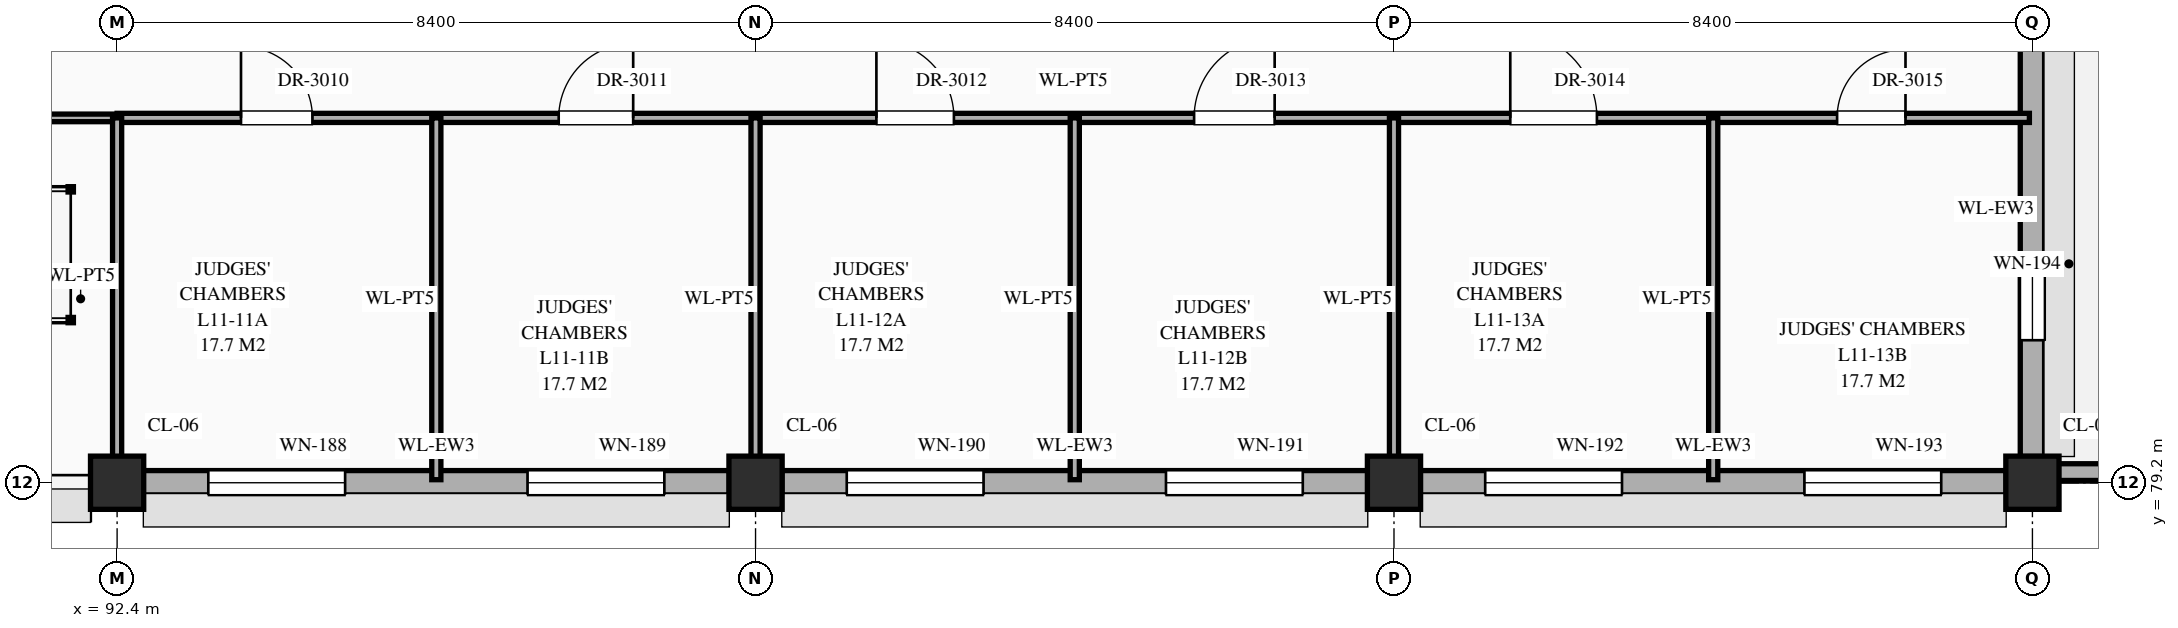
"""IFC4 building model, lengths in metres.
Left out: names, types, materials, properties, quantities, classifications, styles, units other than length and angle.
Written with IfcOpenShell. Run it as: python <this file> out.ifc"""

import sys

from ifc_helpers import new_model, si_unit, direction, frame, frame_2d, origin, origin_2d, place, context, subcontext, project, spatial, rectangle, extrude, element, fill, save


model = new_model("IFC4")
c1 = context("Model", 3, precision=1e-05, world=origin(), true_north=direction((0.0, 1.0)))
c2 = subcontext(c1, "Body", "Model", "MODEL_VIEW")
j1 = project(units=[si_unit("LENGTHUNIT", "METRE"), si_unit("PLANEANGLEUNIT", "RADIAN")], contexts=[c1])
p1 = place(None, origin())
s1 = spatial("IfcSite", under=j1, at=p1, CompositionType="ELEMENT")
p2 = place(p1, origin())
s2 = spatial("IfcBuilding", under=s1, at=p2, CompositionType="ELEMENT")
p3 = place(p2, frame((0.0, 0.0, 47.7)))
s3 = spatial("IfcBuildingStorey", under=s2, at=p3, CompositionType="ELEMENT", Elevation=47.7)
for number, where, z_axis, x_axis in (
    (1, (92.4, 79.2, 0.0), (0.0, 0.0, 1.0), (1.0, 0.0, 0.0)),
    (2, (100.8, 79.2, 0.0), (0.0, 0.0, 1.0), (1.0, 0.0, 0.0)),
    (3, (109.2, 79.2, 0.0), (0.0, 0.0, 1.0), (1.0, 0.0, 0.0)),
    (4, (117.6, 79.2, 0.0), (0.0, 0.0, 1.0), (1.0, 0.0, 0.0)),
):
    element("IfcColumn", number, at=place(p3, frame(where, z_axis=z_axis, x_axis=x_axis)), inside=s3, PredefinedType="COLUMN", context=c2, shape_type="SweptSolid", body=[
        extrude(rectangle(XDim=0.7, YDim=0.7, at=origin_2d()), origin(), (0.0, 0.0, 1.0), 4.2),
    ])
p4 = place(p3, frame((92.745, 79.2, 0.0), z_axis=(0.0, 0.0, 1.0), x_axis=(1.0, 0.0, 0.0)))
e5 = element("IfcWall", 5, at=p4, inside=s3, PredefinedType="STANDARD", context=c2, shape_type="SweptSolid", body=[
    extrude(rectangle(XDim=7.71, YDim=0.32, at=frame_2d((3.855, 0.0))), origin(), (0.0, 0.0, 1.0), 3.31),
])
p5 = place(p4, frame((0.855, 0.0, 0.55)))
e6 = element("IfcOpeningElement", 6, at=p5, cuts=e5, PredefinedType="OPENING", context=c2, shape_type="SweptSolid", body=[
    extrude(rectangle(XDim=1.8, YDim=2.12, at=frame_2d((0.9, 1.06))), frame((0.0, 0.172, 0.0), z_axis=(0.0, -1.0, 0.0), x_axis=(1.0, 0.0, 0.0)), (0.0, 0.0, 1.0), 0.344),
])
p6 = place(p4, frame((5.055, 0.0, 0.55)))
e7 = element("IfcOpeningElement", 7, at=p6, cuts=e5, PredefinedType="OPENING", context=c2, shape_type="SweptSolid", body=[
    extrude(rectangle(XDim=1.8, YDim=2.12, at=frame_2d((0.9, 1.06))), frame((0.0, 0.172, 0.0), z_axis=(0.0, -1.0, 0.0), x_axis=(1.0, 0.0, 0.0)), (0.0, 0.0, 1.0), 0.344),
])
p7 = place(p3, frame((101.145, 79.2, 0.0), z_axis=(0.0, 0.0, 1.0), x_axis=(1.0, 0.0, 0.0)))
e8 = element("IfcWall", 8, at=p7, inside=s3, PredefinedType="STANDARD", context=c2, shape_type="SweptSolid", body=[
    extrude(rectangle(XDim=7.71, YDim=0.32, at=frame_2d((3.855, 0.0))), origin(), (0.0, 0.0, 1.0), 3.31),
])
p8 = place(p7, frame((0.855, 0.0, 0.55)))
e9 = element("IfcOpeningElement", 9, at=p8, cuts=e8, PredefinedType="OPENING", context=c2, shape_type="SweptSolid", body=[
    extrude(rectangle(XDim=1.8, YDim=2.12, at=frame_2d((0.9, 1.06))), frame((0.0, 0.172, 0.0), z_axis=(0.0, -1.0, 0.0), x_axis=(1.0, 0.0, 0.0)), (0.0, 0.0, 1.0), 0.344),
])
p9 = place(p7, frame((5.055, 0.0, 0.55)))
e10 = element("IfcOpeningElement", 10, at=p9, cuts=e8, PredefinedType="OPENING", context=c2, shape_type="SweptSolid", body=[
    extrude(rectangle(XDim=1.8, YDim=2.12, at=frame_2d((0.9, 1.06))), frame((0.0, 0.172, 0.0), z_axis=(0.0, -1.0, 0.0), x_axis=(1.0, 0.0, 0.0)), (0.0, 0.0, 1.0), 0.344),
])
p10 = place(p3, frame((109.545, 79.2, 0.0), z_axis=(0.0, 0.0, 1.0), x_axis=(1.0, 0.0, 0.0)))
e11 = element("IfcWall", 11, at=p10, inside=s3, PredefinedType="STANDARD", context=c2, shape_type="SweptSolid", body=[
    extrude(rectangle(XDim=7.71, YDim=0.32, at=frame_2d((3.855, 0.0))), origin(), (0.0, 0.0, 1.0), 3.31),
])
p11 = place(p10, frame((0.855, 0.0, 0.55)))
e12 = element("IfcOpeningElement", 12, at=p11, cuts=e11, PredefinedType="OPENING", context=c2, shape_type="SweptSolid", body=[
    extrude(rectangle(XDim=1.8, YDim=2.12, at=frame_2d((0.9, 1.06))), frame((0.0, 0.172, 0.0), z_axis=(0.0, -1.0, 0.0), x_axis=(1.0, 0.0, 0.0)), (0.0, 0.0, 1.0), 0.344),
])
p12 = place(p10, frame((5.055, 0.0, 0.55)))
e13 = element("IfcOpeningElement", 13, at=p12, cuts=e11, PredefinedType="OPENING", context=c2, shape_type="SweptSolid", body=[
    extrude(rectangle(XDim=1.8, YDim=2.12, at=frame_2d((0.9, 1.06))), frame((0.0, 0.172, 0.0), z_axis=(0.0, -1.0, 0.0), x_axis=(1.0, 0.0, 0.0)), (0.0, 0.0, 1.0), 0.344),
])
p13 = place(p3, frame((117.6, 79.545, 0.0), z_axis=(0.0, 0.0, 1.0), x_axis=(0.0, 1.0, 0.0)))
e14 = element("IfcWall", 14, at=p13, inside=s3, PredefinedType="STANDARD", context=c2, shape_type="SweptSolid", body=[
    extrude(rectangle(XDim=6.51, YDim=0.32, at=frame_2d((3.255, 0.0))), origin(), (0.0, 0.0, 1.0), 3.31),
])
p14 = place(p13, frame((1.53, 0.0, 0.55)))
e15 = element("IfcOpeningElement", 15, at=p14, cuts=e14, PredefinedType="OPENING", context=c2, shape_type="SweptSolid", body=[
    extrude(rectangle(XDim=1.05, YDim=1.56, at=frame_2d((0.525, 0.78))), frame((0.0, 0.172, 0.0), z_axis=(0.0, -1.0, 0.0), x_axis=(1.0, 0.0, 0.0)), (0.0, 0.0, 1.0), 0.344),
])
p15 = place(p3, frame((117.9, 79.34, 0.0), z_axis=(0.0, 0.0, 1.0), x_axis=(1.0, 0.0, 0.0)))
e16 = element("IfcWall", 16, at=p15, inside=s3, PredefinedType="PARAPET", context=c2, shape_type="SweptSolid", body=[
    extrude(rectangle(XDim=7.96, YDim=0.22, at=frame_2d((3.98, 0.0))), origin(), (0.0, 0.0, 1.0), 1.2),
])
p16 = place(p3, frame((75.6, 84.0, 0.0), z_axis=(0.0, 0.0, 1.0), x_axis=(1.0, 0.0, 0.0)))
e17 = element("IfcWall", 17, at=p16, inside=s3, PredefinedType="STANDARD", context=c2, shape_type="SweptSolid", body=[
    extrude(rectangle(XDim=16.8, YDim=0.1, at=frame_2d((8.4, 0.0))), origin(), (0.0, 0.0, 1.0), 3.96),
])
p17 = place(p16, frame((3.58, 0.0, 0.0)))
e18 = element("IfcOpeningElement", 18, at=p17, cuts=e17, PredefinedType="OPENING", context=c2, shape_type="SweptSolid", body=[
    extrude(rectangle(XDim=1.24, YDim=2.3, at=frame_2d((0.62, 1.15))), frame((0.0, 0.062, 0.0), z_axis=(0.0, -1.0, 0.0), x_axis=(1.0, 0.0, 0.0)), (0.0, 0.0, 1.0), 0.124),
])
p18 = place(p16, frame((11.96, 0.0, 0.0)))
e19 = element("IfcOpeningElement", 19, at=p18, cuts=e17, PredefinedType="OPENING", context=c2, shape_type="SweptSolid", body=[
    extrude(rectangle(XDim=1.28, YDim=2.35, at=frame_2d((0.64, 1.175))), frame((0.0, 0.062, 0.0), z_axis=(0.0, -1.0, 0.0), x_axis=(1.0, 0.0, 0.0)), (0.0, 0.0, 1.0), 0.124),
])
p19 = place(p3, frame((92.4, 84.0, 0.0), z_axis=(0.0, 0.0, 1.0), x_axis=(1.0, 0.0, 0.0)))
e20 = element("IfcWall", 20, at=p19, inside=s3, PredefinedType="STANDARD", context=c2, shape_type="SweptSolid", body=[
    extrude(rectangle(XDim=25.16, YDim=0.12, at=frame_2d((12.58, 0.0))), origin(), (0.0, 0.0, 1.0), 3.96),
])
p20 = place(p19, frame((1.63, 0.0, 0.0)))
e21 = element("IfcOpeningElement", 21, at=p20, cuts=e20, PredefinedType="OPENING", context=c2, shape_type="SweptSolid", body=[
    extrude(rectangle(XDim=0.94, YDim=2.3, at=frame_2d((0.47, 1.15))), frame((0.0, 0.072, 0.0), z_axis=(0.0, -1.0, 0.0), x_axis=(1.0, 0.0, 0.0)), (0.0, 0.0, 1.0), 0.144),
])
p21 = place(p19, frame((5.81, 0.0, 0.0)))
e22 = element("IfcOpeningElement", 22, at=p21, cuts=e20, PredefinedType="OPENING", context=c2, shape_type="SweptSolid", body=[
    extrude(rectangle(XDim=0.98, YDim=2.35, at=frame_2d((0.49, 1.175))), frame((0.0, 0.072, 0.0), z_axis=(0.0, -1.0, 0.0), x_axis=(1.0, 0.0, 0.0)), (0.0, 0.0, 1.0), 0.144),
])
p22 = place(p19, frame((9.99, 0.0, 0.0)))
e23 = element("IfcOpeningElement", 23, at=p22, cuts=e20, PredefinedType="OPENING", context=c2, shape_type="SweptSolid", body=[
    extrude(rectangle(XDim=1.02, YDim=2.4, at=frame_2d((0.51, 1.2))), frame((0.0, 0.072, 0.0), z_axis=(0.0, -1.0, 0.0), x_axis=(1.0, 0.0, 0.0)), (0.0, 0.0, 1.0), 0.144),
])
p23 = place(p19, frame((14.17, 0.0, 0.0)))
e24 = element("IfcOpeningElement", 24, at=p23, cuts=e20, PredefinedType="OPENING", context=c2, shape_type="SweptSolid", body=[
    extrude(rectangle(XDim=1.06, YDim=2.4, at=frame_2d((0.53, 1.2))), frame((0.0, 0.072, 0.0), z_axis=(0.0, -1.0, 0.0), x_axis=(1.0, 0.0, 0.0)), (0.0, 0.0, 1.0), 0.144),
])
p24 = place(p19, frame((18.33, 0.0, 0.0)))
e25 = element("IfcOpeningElement", 25, at=p24, cuts=e20, PredefinedType="OPENING", context=c2, shape_type="SweptSolid", body=[
    extrude(rectangle(XDim=1.14, YDim=2.4, at=frame_2d((0.57, 1.2))), frame((0.0, 0.072, 0.0), z_axis=(0.0, -1.0, 0.0), x_axis=(1.0, 0.0, 0.0)), (0.0, 0.0, 1.0), 0.144),
])
p25 = place(p19, frame((22.63, 0.0, 0.0)))
e26 = element("IfcOpeningElement", 26, at=p25, cuts=e20, PredefinedType="OPENING", context=c2, shape_type="SweptSolid", body=[
    extrude(rectangle(XDim=0.9, YDim=2.15, at=frame_2d((0.45, 1.075))), frame((0.0, 0.072, 0.0), z_axis=(0.0, -1.0, 0.0), x_axis=(1.0, 0.0, 0.0)), (0.0, 0.0, 1.0), 0.144),
])
p26 = place(p3, frame((92.4, 79.24, 0.0), z_axis=(0.0, 0.0, 1.0), x_axis=(0.0, 1.0, 0.0)))
e27 = element("IfcWall", 27, at=p26, inside=s3, PredefinedType="STANDARD", context=c2, shape_type="SweptSolid", body=[
    extrude(rectangle(XDim=4.76, YDim=0.12, at=frame_2d((2.38, 0.0))), origin(), (0.0, 0.0, 1.0), 3.21),
])
p27 = place(p3, frame((96.6, 79.24, 0.0), z_axis=(0.0, 0.0, 1.0), x_axis=(0.0, 1.0, 0.0)))
e28 = element("IfcWall", 28, at=p27, inside=s3, PredefinedType="STANDARD", context=c2, shape_type="SweptSolid", body=[
    extrude(rectangle(XDim=4.76, YDim=0.12, at=frame_2d((2.38, 0.0))), origin(), (0.0, 0.0, 1.0), 3.61),
])
p28 = place(p3, frame((100.8, 79.24, 0.0), z_axis=(0.0, 0.0, 1.0), x_axis=(0.0, 1.0, 0.0)))
e29 = element("IfcWall", 29, at=p28, inside=s3, PredefinedType="STANDARD", context=c2, shape_type="SweptSolid", body=[
    extrude(rectangle(XDim=4.76, YDim=0.12, at=frame_2d((2.38, 0.0))), origin(), (0.0, 0.0, 1.0), 3.21),
])
p29 = place(p3, frame((105.0, 79.24, 0.0), z_axis=(0.0, 0.0, 1.0), x_axis=(0.0, 1.0, 0.0)))
e30 = element("IfcWall", 30, at=p29, inside=s3, PredefinedType="STANDARD", context=c2, shape_type="SweptSolid", body=[
    extrude(rectangle(XDim=4.76, YDim=0.12, at=frame_2d((2.38, 0.0))), origin(), (0.0, 0.0, 1.0), 3.96),
])
p30 = place(p3, frame((109.2, 79.24, 0.0), z_axis=(0.0, 0.0, 1.0), x_axis=(0.0, 1.0, 0.0)))
e31 = element("IfcWall", 31, at=p30, inside=s3, PredefinedType="STANDARD", context=c2, shape_type="SweptSolid", body=[
    extrude(rectangle(XDim=4.76, YDim=0.12, at=frame_2d((2.38, 0.0))), origin(), (0.0, 0.0, 1.0), 3.21),
])
p31 = place(p3, frame((113.4, 79.24, 0.0), z_axis=(0.0, 0.0, 1.0), x_axis=(0.0, 1.0, 0.0)))
e32 = element("IfcWall", 32, at=p31, inside=s3, PredefinedType="STANDARD", context=c2, shape_type="SweptSolid", body=[
    extrude(rectangle(XDim=4.76, YDim=0.12, at=frame_2d((2.38, 0.0))), origin(), (0.0, 0.0, 1.0), 3.61),
])
p32 = place(p5, origin())
e33 = element("IfcWindow", 33, at=p32, inside=s3, PartitioningType="SINGLE_PANEL", PredefinedType="WINDOW", context=c2, shape_type="SweptSolid", body=[
    extrude(rectangle(XDim=1.8, YDim=2.12, at=frame_2d((0.9, 1.06))), frame((0.0, 0.03, 0.0), z_axis=(0.0, -1.0, 0.0), x_axis=(1.0, 0.0, 0.0)), (0.0, 0.0, 1.0), 0.06),
])
fill(e6, e33)
p33 = place(p6, origin())
e34 = element("IfcWindow", 34, at=p33, inside=s3, PartitioningType="SINGLE_PANEL", PredefinedType="WINDOW", context=c2, shape_type="SweptSolid", body=[
    extrude(rectangle(XDim=1.8, YDim=2.12, at=frame_2d((0.9, 1.06))), frame((0.0, 0.03, 0.0), z_axis=(0.0, -1.0, 0.0), x_axis=(1.0, 0.0, 0.0)), (0.0, 0.0, 1.0), 0.06),
])
fill(e7, e34)
p34 = place(p8, origin())
e35 = element("IfcWindow", 35, at=p34, inside=s3, PartitioningType="SINGLE_PANEL", PredefinedType="WINDOW", context=c2, shape_type="SweptSolid", body=[
    extrude(rectangle(XDim=1.8, YDim=2.12, at=frame_2d((0.9, 1.06))), frame((0.0, 0.03, 0.0), z_axis=(0.0, -1.0, 0.0), x_axis=(1.0, 0.0, 0.0)), (0.0, 0.0, 1.0), 0.06),
])
fill(e9, e35)
p35 = place(p9, origin())
e36 = element("IfcWindow", 36, at=p35, inside=s3, PartitioningType="SINGLE_PANEL", PredefinedType="WINDOW", context=c2, shape_type="SweptSolid", body=[
    extrude(rectangle(XDim=1.8, YDim=2.12, at=frame_2d((0.9, 1.06))), frame((0.0, 0.03, 0.0), z_axis=(0.0, -1.0, 0.0), x_axis=(1.0, 0.0, 0.0)), (0.0, 0.0, 1.0), 0.06),
])
fill(e10, e36)
p36 = place(p11, origin())
e37 = element("IfcWindow", 37, at=p36, inside=s3, PartitioningType="SINGLE_PANEL", PredefinedType="WINDOW", context=c2, shape_type="SweptSolid", body=[
    extrude(rectangle(XDim=1.8, YDim=2.12, at=frame_2d((0.9, 1.06))), frame((0.0, 0.03, 0.0), z_axis=(0.0, -1.0, 0.0), x_axis=(1.0, 0.0, 0.0)), (0.0, 0.0, 1.0), 0.06),
])
fill(e12, e37)
p37 = place(p12, origin())
e38 = element("IfcWindow", 38, at=p37, inside=s3, PartitioningType="SINGLE_PANEL", PredefinedType="WINDOW", context=c2, shape_type="SweptSolid", body=[
    extrude(rectangle(XDim=1.8, YDim=2.12, at=frame_2d((0.9, 1.06))), frame((0.0, 0.03, 0.0), z_axis=(0.0, -1.0, 0.0), x_axis=(1.0, 0.0, 0.0)), (0.0, 0.0, 1.0), 0.06),
])
fill(e13, e38)
p38 = place(p14, origin())
e39 = element("IfcWindow", 39, at=p38, inside=s3, PartitioningType="SINGLE_PANEL", PredefinedType="WINDOW", context=c2, shape_type="SweptSolid", body=[
    extrude(rectangle(XDim=1.05, YDim=1.56, at=frame_2d((0.525, 0.78))), frame((0.0, 0.03, 0.0), z_axis=(0.0, -1.0, 0.0), x_axis=(1.0, 0.0, 0.0)), (0.0, 0.0, 1.0), 0.06),
])
fill(e15, e39)
p39 = place(p20, origin())
e40 = element("IfcDoor", 40, at=p39, inside=s3, OperationType="SINGLE_SWING_LEFT", PredefinedType="DOOR", context=c2, shape_type="SweptSolid", body=[
    extrude(rectangle(XDim=0.94, YDim=2.3, at=frame_2d((0.47, 1.15))), frame((0.0, 0.025, 0.0), z_axis=(0.0, -1.0, 0.0), x_axis=(1.0, 0.0, 0.0)), (0.0, 0.0, 1.0), 0.05),
])
fill(e21, e40)
p40 = place(p21, origin())
e41 = element("IfcDoor", 41, at=p40, inside=s3, OperationType="SINGLE_SWING_RIGHT", PredefinedType="DOOR", context=c2, shape_type="SweptSolid", body=[
    extrude(rectangle(XDim=0.98, YDim=2.35, at=frame_2d((0.49, 1.175))), frame((0.0, 0.025, 0.0), z_axis=(0.0, -1.0, 0.0), x_axis=(1.0, 0.0, 0.0)), (0.0, 0.0, 1.0), 0.05),
])
fill(e22, e41)
p41 = place(p22, origin())
e42 = element("IfcDoor", 42, at=p41, inside=s3, OperationType="SINGLE_SWING_LEFT", PredefinedType="DOOR", context=c2, shape_type="SweptSolid", body=[
    extrude(rectangle(XDim=1.02, YDim=2.4, at=frame_2d((0.51, 1.2))), frame((0.0, 0.025, 0.0), z_axis=(0.0, -1.0, 0.0), x_axis=(1.0, 0.0, 0.0)), (0.0, 0.0, 1.0), 0.05),
])
fill(e23, e42)
p42 = place(p23, origin())
e43 = element("IfcDoor", 43, at=p42, inside=s3, OperationType="SINGLE_SWING_RIGHT", PredefinedType="DOOR", context=c2, shape_type="SweptSolid", body=[
    extrude(rectangle(XDim=1.06, YDim=2.4, at=frame_2d((0.53, 1.2))), frame((0.0, 0.025, 0.0), z_axis=(0.0, -1.0, 0.0), x_axis=(1.0, 0.0, 0.0)), (0.0, 0.0, 1.0), 0.05),
])
fill(e24, e43)
p43 = place(p24, origin())
e44 = element("IfcDoor", 44, at=p43, inside=s3, OperationType="SINGLE_SWING_LEFT", PredefinedType="DOOR", context=c2, shape_type="SweptSolid", body=[
    extrude(rectangle(XDim=1.14, YDim=2.4, at=frame_2d((0.57, 1.2))), frame((0.0, 0.025, 0.0), z_axis=(0.0, -1.0, 0.0), x_axis=(1.0, 0.0, 0.0)), (0.0, 0.0, 1.0), 0.05),
])
fill(e25, e44)
p44 = place(p25, origin())
e45 = element("IfcDoor", 45, at=p44, inside=s3, OperationType="SINGLE_SWING_RIGHT", PredefinedType="DOOR", context=c2, shape_type="SweptSolid", body=[
    extrude(rectangle(XDim=0.9, YDim=2.15, at=frame_2d((0.45, 1.075))), frame((0.0, 0.025, 0.0), z_axis=(0.0, -1.0, 0.0), x_axis=(1.0, 0.0, 0.0)), (0.0, 0.0, 1.0), 0.05),
])
fill(e26, e45)
save(model, sys.argv[1])
